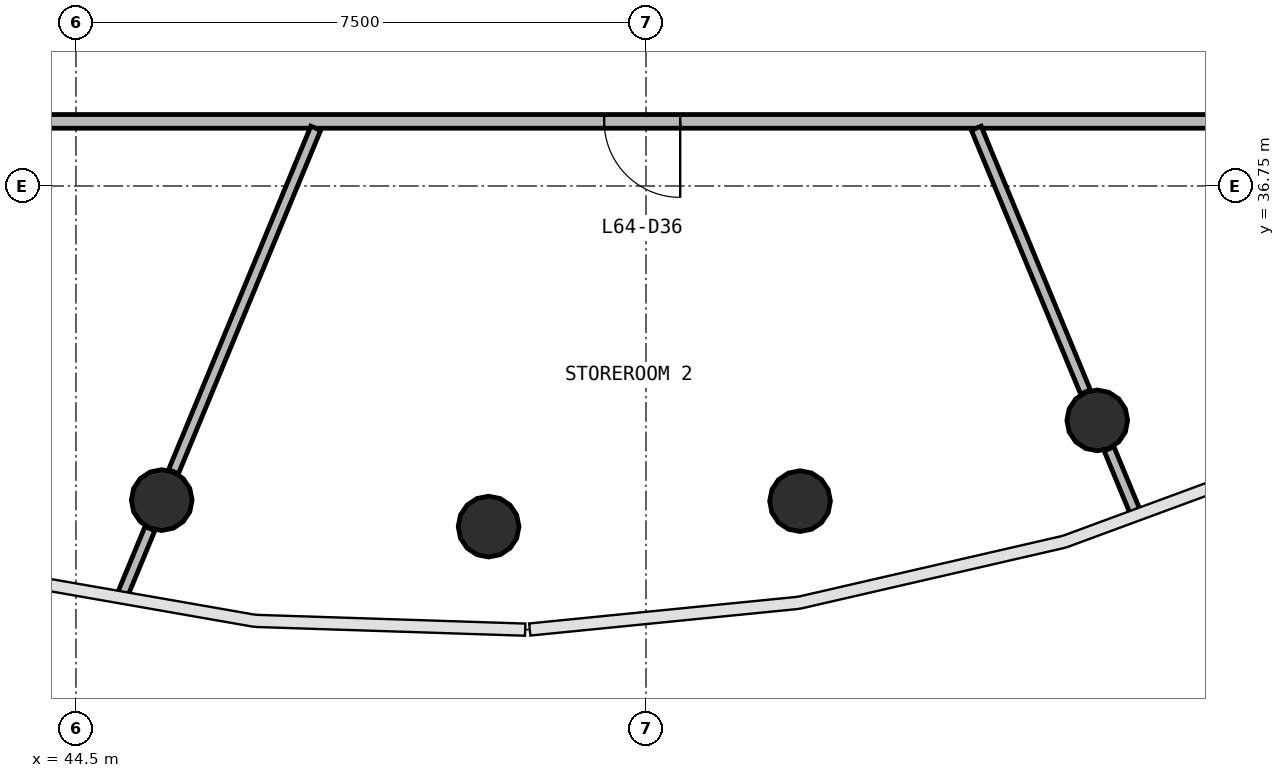
"""IFC4 building model, lengths in metres.
Left out: names, types, materials, properties, quantities, classifications, styles, units other than length and angle.
Written with IfcOpenShell. Run it as: python <this file> out.ifc"""

import sys

from ifc_helpers import new_model, si_unit, direction, frame, frame_2d, origin, origin_2d, place, context, subcontext, project, spatial, rectangle, circle, extrude, source, transform, mapped, element, fill, save


model = new_model("IFC4")
c1 = context("Model", 3, precision=1e-05, world=origin(), true_north=direction((0.0, 1.0)))
c2 = subcontext(c1, "Body", "Model", "MODEL_VIEW")
j1 = project(units=[si_unit("LENGTHUNIT", "METRE"), si_unit("PLANEANGLEUNIT", "RADIAN")], contexts=[c1])
p1 = place(None, origin())
s1 = spatial("IfcSite", under=j1, at=p1, CompositionType="ELEMENT")
p2 = place(p1, origin())
s2 = spatial("IfcBuilding", under=s1, at=p2, CompositionType="ELEMENT")
p3 = place(p2, frame((0.0, 0.0, 261.8)))
s3 = spatial("IfcBuildingStorey", under=s2, at=p3, CompositionType="ELEMENT", Elevation=261.8)
m1 = source(origin(), c2, "Body", "SweptSolid", [
    extrude(circle(Radius=0.4, at=origin_2d()), origin(), (0.0, 0.0, 1.0), 3.9),
])
for number, where, z_axis, x_axis in (
    (1, (45.628, 32.617, 0.0), (0.0, 0.0, 1.0), (1.0, 0.0, 0.0)),
    (2, (49.929, 32.269, 0.0), (0.0, 0.0, 1.0), (1.0, 0.0, 0.0)),
    (3, (54.027, 32.604, 0.0), (0.0, 0.0, 1.0), (1.0, 0.0, 0.0)),
    (4, (57.937, 33.666, 0.0), (0.0, 0.0, 1.0), (1.0, 0.0, 0.0)),
):
    element("IfcColumn", number, at=place(p3, frame(where, z_axis=z_axis, x_axis=x_axis)), inside=s3, PredefinedType="COLUMN", context=c2, shape_type="MappedRepresentation", body=[
        mapped(m1, transform((0.0, 0.0, 0.0), scale=1.0)),
    ])
p4 = place(p3, frame((63.4, 37.6, 0.0), z_axis=(0.0, 0.0, 1.0), x_axis=(-1.0, 0.0, 0.0)))
e5 = element("IfcWall", 5, at=p4, inside=s3, PredefinedType="PARTITIONING", context=c2, shape_type="SweptSolid", body=[
    extrude(rectangle(XDim=22.8, YDim=0.18, at=frame_2d((11.4, 0.0))), origin(), (0.0, 0.0, 1.0), 2.75),
])
p5 = place(p4, frame((10.95, 0.0, 0.0)))
e6 = element("IfcOpeningElement", 6, at=p5, cuts=e5, PredefinedType="OPENING", context=c2, shape_type="SweptSolid", body=[
    extrude(rectangle(XDim=1.0, YDim=2.1, at=frame_2d((0.5, 1.05))), frame((0.0, 0.1, 0.0), z_axis=(0.0, -1.0, 0.0), x_axis=(1.0, 0.0, 0.0)), (0.0, 0.0, 1.0), 0.2),
])
p6 = place(p3, frame((47.655, 37.51, 0.0), z_axis=(0.0, 0.0, 1.0), x_axis=(-0.382689806821, -0.923876892099, 0.0)))
e7 = element("IfcWall", 7, at=p6, inside=s3, PredefinedType="PARTITIONING", context=c2, shape_type="SweptSolid", body=[
    extrude(rectangle(XDim=4.891, YDim=0.14, at=frame_2d((2.445, 0.0))), origin(), (0.0, 0.0, 1.0), 2.75),
])
p7 = place(p3, frame((56.345, 37.51, 0.0), z_axis=(0.0, 0.0, 1.0), x_axis=(0.382638866773, -0.923897990925, 0.0)))
e8 = element("IfcWall", 8, at=p7, inside=s3, PredefinedType="PARTITIONING", context=c2, shape_type="SweptSolid", body=[
    extrude(rectangle(XDim=3.756, YDim=0.14, at=frame_2d((1.878, 0.0))), origin(), (0.0, 0.0, 1.0), 2.75),
])
p8 = place(p3, frame((45.473, 32.243, 0.0), z_axis=(0.0, 0.0, 1.0), x_axis=(-0.382781658682, -0.923838839721, 0.0)))
e9 = element("IfcWall", 9, at=p8, inside=s3, PredefinedType="PARTITIONING", context=c2, shape_type="SweptSolid", body=[
    extrude(rectangle(XDim=0.936, YDim=0.14, at=frame_2d((0.468, 0.0))), origin(), (0.0, 0.0, 1.0), 2.75),
])
p9 = place(p3, frame((58.092, 33.292, 0.0), z_axis=(0.0, 0.0, 1.0), x_axis=(0.382801251463, -0.923830721441, 0.0)))
e10 = element("IfcWall", 10, at=p9, inside=s3, PredefinedType="PARTITIONING", context=c2, shape_type="SweptSolid", body=[
    extrude(rectangle(XDim=0.879, YDim=0.14, at=frame_2d((0.44, 0.0))), origin(), (0.0, 0.0, 1.0), 2.75),
])
m2 = source(origin(), c2, "Body", "SweptSolid", [
    extrude(rectangle(XDim=1.0, YDim=2.1, at=frame_2d((0.5, 1.05))), frame((0.0, 0.025, 0.0), z_axis=(0.0, -1.0, 0.0), x_axis=(1.0, 0.0, 0.0)), (0.0, 0.0, 1.0), 0.05),
])
p10 = place(p5, origin())
e11 = element("IfcDoor", 11, at=p10, inside=s3, OperationType="SINGLE_SWING_LEFT", PredefinedType="DOOR", context=c2, shape_type="MappedRepresentation", body=[
    mapped(m2, transform((0.0, 0.0, 0.0), scale=1.0)),
])
fill(e6, e11)
save(model, sys.argv[1])
